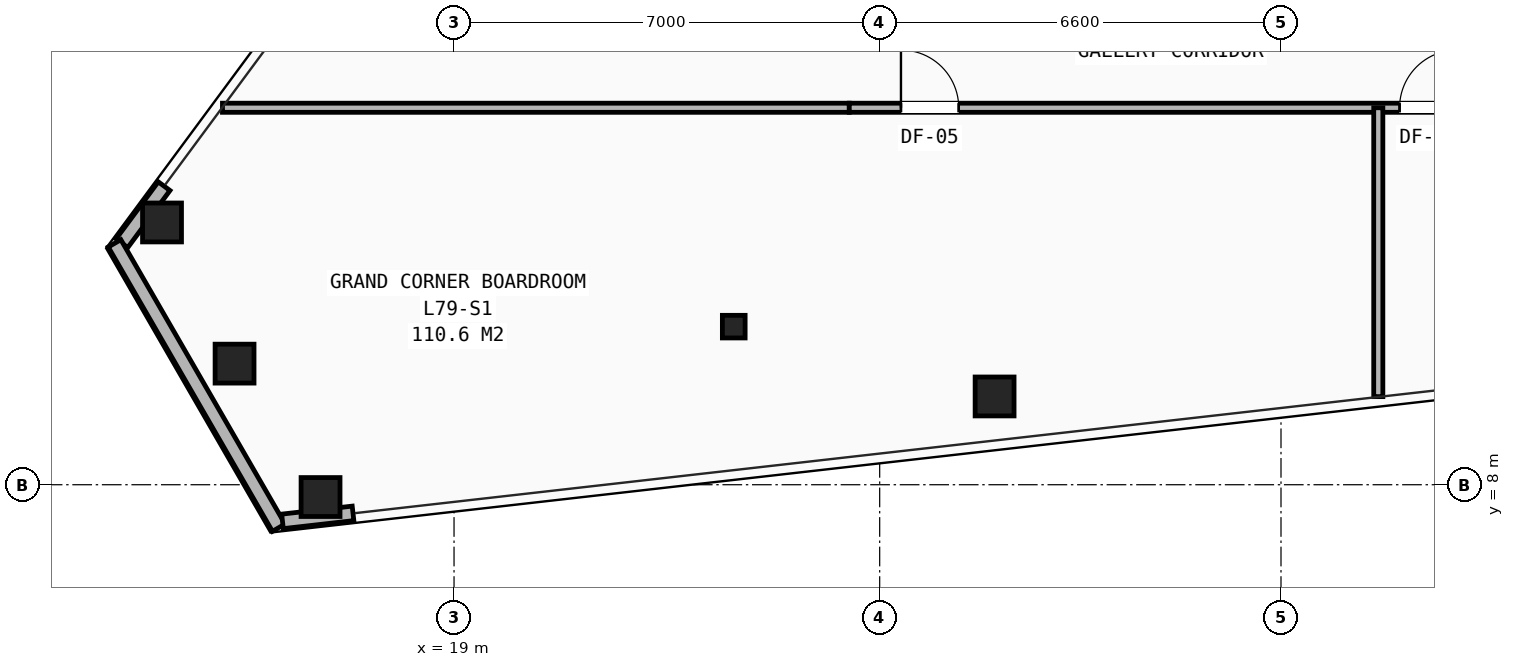
"""IFC4 building model, lengths in metres.
Left out: names, types, materials, properties, quantities, classifications, styles, units other than length and angle.
Written with IfcOpenShell. Run it as: python <this file> out.ifc"""

import sys

from ifc_helpers import new_model, si_unit, direction, frame, frame_2d, origin, origin_2d, place, context, subcontext, project, spatial, rectangle, hollow_rectangle, i_section, extrude, element, fill, save


model = new_model("IFC4")
c1 = context("Model", 3, precision=1e-05, world=origin(), true_north=direction((0.0, 1.0)))
c2 = subcontext(c1, "Body", "Model", "MODEL_VIEW")
j1 = project(units=[si_unit("LENGTHUNIT", "METRE"), si_unit("PLANEANGLEUNIT", "RADIAN")], contexts=[c1])
p1 = place(None, origin())
s1 = spatial("IfcSite", under=j1, at=p1, CompositionType="ELEMENT")
p2 = place(p1, origin())
s2 = spatial("IfcBuilding", under=s1, at=p2, CompositionType="ELEMENT")
p3 = place(p2, frame((0.0, 0.0, 279.5)))
s3 = spatial("IfcBuildingStorey", under=s2, at=p3, CompositionType="ELEMENT", Elevation=279.5)
p4 = place(p3, frame((23.6, 10.6, 0.0), z_axis=(0.0, 0.0, 1.0), x_axis=(1.0, 0.0, 0.0)))
e1 = element("IfcColumn", 1, at=p4, inside=s3, PredefinedType="COLUMN", context=c2, shape_type="SweptSolid", body=[
    extrude(i_section(OverallWidth=0.374, OverallDepth=0.372, WebThickness=0.016, FlangeThickness=0.026, at=origin_2d()), origin(), (0.0, 0.0, 1.0), 3.5),
])
for number, where, z_axis, x_axis in (
    (2, (14.198, 12.313, 0.0), (0.0, 0.0, 1.0), (1.0, 0.0, 0.0)),
    (3, (15.39, 9.992, 0.0), (0.0, 0.0, 1.0), (1.0, 0.0, 0.0)),
    (4, (16.805, 7.798, 0.0), (0.0, 0.0, 1.0), (1.0, 0.0, 0.0)),
    (5, (27.89, 9.452, 0.0), (0.0, 0.0, 1.0), (1.0, 0.0, 0.0)),
):
    element("IfcColumn", number, at=place(p3, frame(where, z_axis=z_axis, x_axis=x_axis)), inside=s3, PredefinedType="COLUMN", context=c2, shape_type="SweptSolid", body=[
        extrude(hollow_rectangle(XDim=0.64, YDim=0.64, WallThickness=0.045, at=origin_2d()), origin(), (0.0, 0.0, 1.0), 3.5),
    ])
p5 = place(p3, frame((14.232, 12.91, 0.0), z_axis=(0.0, 0.0, 1.0), x_axis=(-0.594532170537, -0.804071824029, 0.0)))
e6 = element("IfcWall", 6, at=p5, inside=s3, PredefinedType="SHEAR", context=c2, shape_type="SweptSolid", body=[
    extrude(rectangle(XDim=1.167, YDim=0.24, at=frame_2d((0.584, 0.0))), origin(), (0.0, 0.0, 1.0), 2.623),
])
p6 = place(p3, frame((16.117, 7.293, 0.0), z_axis=(0.0, 0.0, 1.0), x_axis=(-0.49997552693, 0.866039532857, 0.0)))
e7 = element("IfcWall", 7, at=p6, inside=s3, PredefinedType="SHEAR", context=c2, shape_type="SweptSolid", body=[
    extrude(rectangle(XDim=5.4, YDim=0.24, at=frame_2d((2.7, 0.0))), origin(), (0.0, 0.0, 1.0), 2.623),
])
p7 = place(p3, frame((16.179, 7.397, 0.0), z_axis=(0.0, 0.0, 1.0), x_axis=(0.993628691443, 0.112703254353, 0.0)))
e8 = element("IfcWall", 8, at=p7, inside=s3, PredefinedType="SHEAR", context=c2, shape_type="SweptSolid", body=[
    extrude(rectangle(XDim=1.167, YDim=0.24, at=frame_2d((0.584, 0.0))), origin(), (0.0, 0.0, 1.0), 2.623),
])
p8 = place(p3, frame((15.192, 14.2, 0.0), z_axis=(0.0, 0.0, 1.0), x_axis=(1.0, 0.0, 0.0)))
e9 = element("IfcWall", 9, at=p8, inside=s3, PredefinedType="PARTITIONING", context=c2, shape_type="SweptSolid", body=[
    extrude(rectangle(XDim=10.308, YDim=0.15, at=frame_2d((5.154, 0.0))), origin(), (0.0, 0.0, 1.0), 2.292),
])
p9 = place(p3, frame((25.5, 14.2, 0.0), z_axis=(0.0, 0.0, 1.0), x_axis=(1.0, 0.0, 0.0)))
e10 = element("IfcWall", 10, at=p9, inside=s3, PredefinedType="PARTITIONING", context=c2, shape_type="SweptSolid", body=[
    extrude(rectangle(XDim=29.0, YDim=0.15, at=frame_2d((14.5, 0.0))), origin(), (0.0, 0.0, 1.0), 2.292),
])
p10 = place(p9, frame((0.85, 0.0, 0.0)))
e11 = element("IfcOpeningElement", 11, at=p10, cuts=e10, PredefinedType="OPENING", context=c2, shape_type="SweptSolid", body=[
    extrude(rectangle(XDim=0.95, YDim=2.1, at=frame_2d((0.475, 1.05))), frame((0.0, 0.085, 0.0), z_axis=(0.0, -1.0, 0.0), x_axis=(1.0, 0.0, 0.0)), (0.0, 0.0, 1.0), 0.17),
])
p11 = place(p9, frame((9.05, 0.0, 0.0)))
e12 = element("IfcOpeningElement", 12, at=p11, cuts=e10, PredefinedType="OPENING", context=c2, shape_type="SweptSolid", body=[
    extrude(rectangle(XDim=0.95, YDim=2.1, at=frame_2d((0.475, 1.05))), frame((0.0, 0.085, 0.0), z_axis=(0.0, -1.0, 0.0), x_axis=(1.0, 0.0, 0.0)), (0.0, 0.0, 1.0), 0.17),
])
p12 = place(p9, frame((14.45, 0.0, 0.0)))
e13 = element("IfcOpeningElement", 13, at=p12, cuts=e10, PredefinedType="OPENING", context=c2, shape_type="SweptSolid", body=[
    extrude(rectangle(XDim=0.95, YDim=2.1, at=frame_2d((0.475, 1.05))), frame((0.0, 0.085, 0.0), z_axis=(0.0, -1.0, 0.0), x_axis=(1.0, 0.0, 0.0)), (0.0, 0.0, 1.0), 0.17),
])
p13 = place(p9, frame((18.85, 0.0, 0.0)))
e14 = element("IfcOpeningElement", 14, at=p13, cuts=e10, PredefinedType="OPENING", context=c2, shape_type="SweptSolid", body=[
    extrude(rectangle(XDim=0.95, YDim=2.1, at=frame_2d((0.475, 1.05))), frame((0.0, 0.085, 0.0), z_axis=(0.0, -1.0, 0.0), x_axis=(1.0, 0.0, 0.0)), (0.0, 0.0, 1.0), 0.17),
])
p14 = place(p3, frame((34.2, 9.449, 0.0), z_axis=(0.0, 0.0, 1.0), x_axis=(0.0, 1.0, 0.0)))
e15 = element("IfcWall", 15, at=p14, inside=s3, PredefinedType="PARTITIONING", context=c2, shape_type="SweptSolid", body=[
    extrude(rectangle(XDim=4.751, YDim=0.15, at=frame_2d((2.375, 0.0))), origin(), (0.0, 0.0, 1.0), 2.628),
])
p15 = place(p10, origin())
e16 = element("IfcDoor", 16, at=p15, inside=s3, OperationType="SINGLE_SWING_LEFT", PredefinedType="DOOR", context=c2, shape_type="SweptSolid", body=[
    extrude(rectangle(XDim=0.95, YDim=2.1, at=frame_2d((0.475, 1.05))), frame((0.0, 0.025, 0.0), z_axis=(0.0, -1.0, 0.0), x_axis=(1.0, 0.0, 0.0)), (0.0, 0.0, 1.0), 0.05),
])
fill(e11, e16)
p16 = place(p11, origin())
e17 = element("IfcDoor", 17, at=p16, inside=s3, OperationType="SINGLE_SWING_RIGHT", PredefinedType="DOOR", context=c2, shape_type="SweptSolid", body=[
    extrude(rectangle(XDim=0.95, YDim=2.1, at=frame_2d((0.475, 1.05))), frame((0.0, 0.025, 0.0), z_axis=(0.0, -1.0, 0.0), x_axis=(1.0, 0.0, 0.0)), (0.0, 0.0, 1.0), 0.05),
])
fill(e12, e17)
save(model, sys.argv[1])
